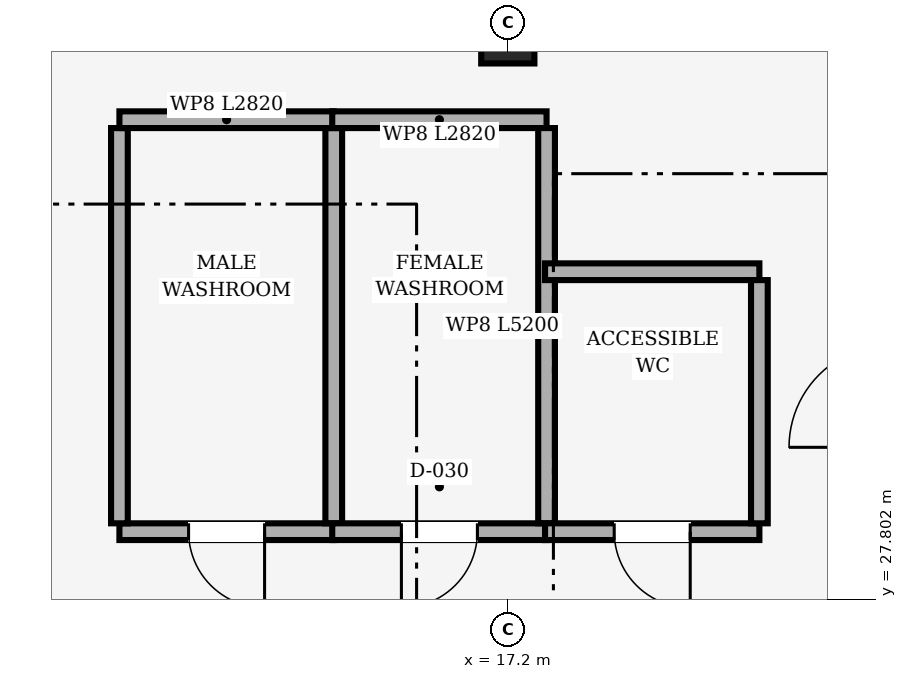
"""IFC4 building model, lengths in metres.
Left out: names, types, materials, properties, quantities, classifications, styles, units other than length and angle.
Written with IfcOpenShell. Run it as: python <this file> out.ifc"""

import sys

from ifc_helpers import new_model, si_unit, direction, frame, frame_2d, origin, origin_2d, place, context, subcontext, project, spatial, rectangle, extrude, element, fill, save


model = new_model("IFC4")
c1 = context("Model", 3, precision=1e-05, world=origin(), true_north=direction((0.0, 1.0)))
c2 = subcontext(c1, "Body", "Model", "MODEL_VIEW")
j1 = project(units=[si_unit("LENGTHUNIT", "METRE"), si_unit("PLANEANGLEUNIT", "RADIAN")], contexts=[c1])
p1 = place(None, origin())
s1 = spatial("IfcSite", under=j1, at=p1, CompositionType="ELEMENT")
p2 = place(p1, origin())
s2 = spatial("IfcBuilding", under=s1, at=p2, CompositionType="ELEMENT")
p3 = place(p2, frame((0.0, 0.0, 15.6)))
s3 = spatial("IfcBuildingStorey", under=s2, at=p3, CompositionType="ELEMENT", Elevation=15.6)
p4 = place(p3, frame((17.2, 35.2, 0.0), z_axis=(0.0, 0.0, 1.0), x_axis=(1.0, 0.0, 0.0)))
e1 = element("IfcColumn", 1, at=p4, inside=s3, PredefinedType="COLUMN", context=c2, shape_type="SweptSolid", body=[
    extrude(rectangle(XDim=0.7, YDim=0.7, at=origin_2d()), origin(), (0.0, 0.0, 1.0), 3.2),
])
p5 = place(p3, frame((14.91, 28.69, 0.0), z_axis=(0.0, 0.0, 1.0), x_axis=(-1.0, 0.0, 0.0)))
e2 = element("IfcWall", 2, at=p5, inside=s3, PredefinedType="PLUMBINGWALL", context=c2, shape_type="SweptSolid", body=[
    extrude(rectangle(XDim=2.82, YDim=0.22, at=frame_2d((1.41, 0.0))), origin(), (0.0, 0.0, 1.0), 3.18),
])
p6 = place(p5, frame((0.91, 0.0, 0.0)))
e3 = element("IfcOpeningElement", 3, at=p6, cuts=e2, PredefinedType="OPENING", context=c2, shape_type="SweptSolid", body=[
    extrude(rectangle(XDim=1.0, YDim=2.1, at=frame_2d((0.5, 1.05))), frame((0.0, 0.11, 0.0), z_axis=(0.0, -1.0, 0.0), x_axis=(1.0, 0.0, 0.0)), (0.0, 0.0, 1.0), 0.22),
])
p7 = place(p3, frame((12.09, 28.8, 0.0), z_axis=(0.0, 0.0, 1.0), x_axis=(0.0, 1.0, 0.0)))
e4 = element("IfcWall", 4, at=p7, inside=s3, PredefinedType="PLUMBINGWALL", context=c2, shape_type="SweptSolid", body=[
    extrude(rectangle(XDim=5.2, YDim=0.22, at=frame_2d((2.6, 0.0))), origin(), (0.0, 0.0, 1.0), 3.18),
])
p8 = place(p3, frame((12.09, 34.11, 0.0), z_axis=(0.0, 0.0, 1.0), x_axis=(1.0, 0.0, 0.0)))
e5 = element("IfcWall", 5, at=p8, inside=s3, PredefinedType="PLUMBINGWALL", context=c2, shape_type="SweptSolid", body=[
    extrude(rectangle(XDim=2.82, YDim=0.22, at=frame_2d((1.41, 0.0))), origin(), (0.0, 0.0, 1.0), 3.18),
])
p9 = place(p3, frame((14.91, 34.0, 0.0), z_axis=(0.0, 0.0, 1.0), x_axis=(0.0, -1.0, 0.0)))
e6 = element("IfcWall", 6, at=p9, inside=s3, PredefinedType="PLUMBINGWALL", context=c2, shape_type="SweptSolid", body=[
    extrude(rectangle(XDim=5.2, YDim=0.22, at=frame_2d((2.6, 0.0))), origin(), (0.0, 0.0, 1.0), 3.18),
])
p10 = place(p3, frame((17.71, 28.69, 0.0), z_axis=(0.0, 0.0, 1.0), x_axis=(-1.0, 0.0, 0.0)))
e7 = element("IfcWall", 7, at=p10, inside=s3, PredefinedType="PLUMBINGWALL", context=c2, shape_type="SweptSolid", body=[
    extrude(rectangle(XDim=2.82, YDim=0.22, at=frame_2d((1.41, 0.0))), origin(), (0.0, 0.0, 1.0), 3.18),
])
p11 = place(p10, frame((0.91, 0.0, 0.0)))
e8 = element("IfcOpeningElement", 8, at=p11, cuts=e7, PredefinedType="OPENING", context=c2, shape_type="SweptSolid", body=[
    extrude(rectangle(XDim=1.0, YDim=2.1, at=frame_2d((0.5, 1.05))), frame((0.0, 0.11, 0.0), z_axis=(0.0, -1.0, 0.0), x_axis=(1.0, 0.0, 0.0)), (0.0, 0.0, 1.0), 0.22),
])
p12 = place(p3, frame((14.89, 34.11, 0.0), z_axis=(0.0, 0.0, 1.0), x_axis=(1.0, 0.0, 0.0)))
e9 = element("IfcWall", 9, at=p12, inside=s3, PredefinedType="PLUMBINGWALL", context=c2, shape_type="SweptSolid", body=[
    extrude(rectangle(XDim=2.82, YDim=0.22, at=frame_2d((1.41, 0.0))), origin(), (0.0, 0.0, 1.0), 3.18),
])
p13 = place(p3, frame((17.71, 34.0, 0.0), z_axis=(0.0, 0.0, 1.0), x_axis=(0.0, -1.0, 0.0)))
e10 = element("IfcWall", 10, at=p13, inside=s3, PredefinedType="PLUMBINGWALL", context=c2, shape_type="SweptSolid", body=[
    extrude(rectangle(XDim=5.2, YDim=0.22, at=frame_2d((2.6, 0.0))), origin(), (0.0, 0.0, 1.0), 3.18),
])
p14 = place(p3, frame((20.51, 28.69, 0.0), z_axis=(0.0, 0.0, 1.0), x_axis=(-1.0, 0.0, 0.0)))
e11 = element("IfcWall", 11, at=p14, inside=s3, PredefinedType="PLUMBINGWALL", context=c2, shape_type="SweptSolid", body=[
    extrude(rectangle(XDim=2.82, YDim=0.22, at=frame_2d((1.41, 0.0))), origin(), (0.0, 0.0, 1.0), 3.18),
])
p15 = place(p14, frame((0.91, 0.0, 0.0)))
e12 = element("IfcOpeningElement", 12, at=p15, cuts=e11, PredefinedType="OPENING", context=c2, shape_type="SweptSolid", body=[
    extrude(rectangle(XDim=1.0, YDim=2.1, at=frame_2d((0.5, 1.05))), frame((0.0, 0.11, 0.0), z_axis=(0.0, -1.0, 0.0), x_axis=(1.0, 0.0, 0.0)), (0.0, 0.0, 1.0), 0.22),
])
p16 = place(p3, frame((17.69, 32.11, 0.0), z_axis=(0.0, 0.0, 1.0), x_axis=(1.0, 0.0, 0.0)))
e13 = element("IfcWall", 13, at=p16, inside=s3, PredefinedType="PLUMBINGWALL", context=c2, shape_type="SweptSolid", body=[
    extrude(rectangle(XDim=2.82, YDim=0.22, at=frame_2d((1.41, 0.0))), origin(), (0.0, 0.0, 1.0), 3.18),
])
p17 = place(p3, frame((20.51, 32.0, 0.0), z_axis=(0.0, 0.0, 1.0), x_axis=(0.0, -1.0, 0.0)))
e14 = element("IfcWall", 14, at=p17, inside=s3, PredefinedType="PLUMBINGWALL", context=c2, shape_type="SweptSolid", body=[
    extrude(rectangle(XDim=3.2, YDim=0.22, at=frame_2d((1.6, 0.0))), origin(), (0.0, 0.0, 1.0), 3.18),
])
p18 = place(p6, origin())
e15 = element("IfcDoor", 15, at=p18, inside=s3, OperationType="SINGLE_SWING_LEFT", PredefinedType="DOOR", context=c2, shape_type="SweptSolid", body=[
    extrude(rectangle(XDim=1.0, YDim=2.1, at=frame_2d((0.5, 1.05))), frame((0.0, 0.025, 0.0), z_axis=(0.0, -1.0, 0.0), x_axis=(1.0, 0.0, 0.0)), (0.0, 0.0, 1.0), 0.05),
])
fill(e3, e15)
p19 = place(p11, origin())
e16 = element("IfcDoor", 16, at=p19, inside=s3, OperationType="SINGLE_SWING_RIGHT", PredefinedType="DOOR", context=c2, shape_type="SweptSolid", body=[
    extrude(rectangle(XDim=1.0, YDim=2.1, at=frame_2d((0.5, 1.05))), frame((0.0, 0.025, 0.0), z_axis=(0.0, -1.0, 0.0), x_axis=(1.0, 0.0, 0.0)), (0.0, 0.0, 1.0), 0.05),
])
fill(e8, e16)
p20 = place(p15, origin())
e17 = element("IfcDoor", 17, at=p20, inside=s3, OperationType="SINGLE_SWING_LEFT", PredefinedType="DOOR", context=c2, shape_type="SweptSolid", body=[
    extrude(rectangle(XDim=1.0, YDim=2.1, at=frame_2d((0.5, 1.05))), frame((0.0, 0.025, 0.0), z_axis=(0.0, -1.0, 0.0), x_axis=(1.0, 0.0, 0.0)), (0.0, 0.0, 1.0), 0.05),
])
fill(e12, e17)
save(model, sys.argv[1])
